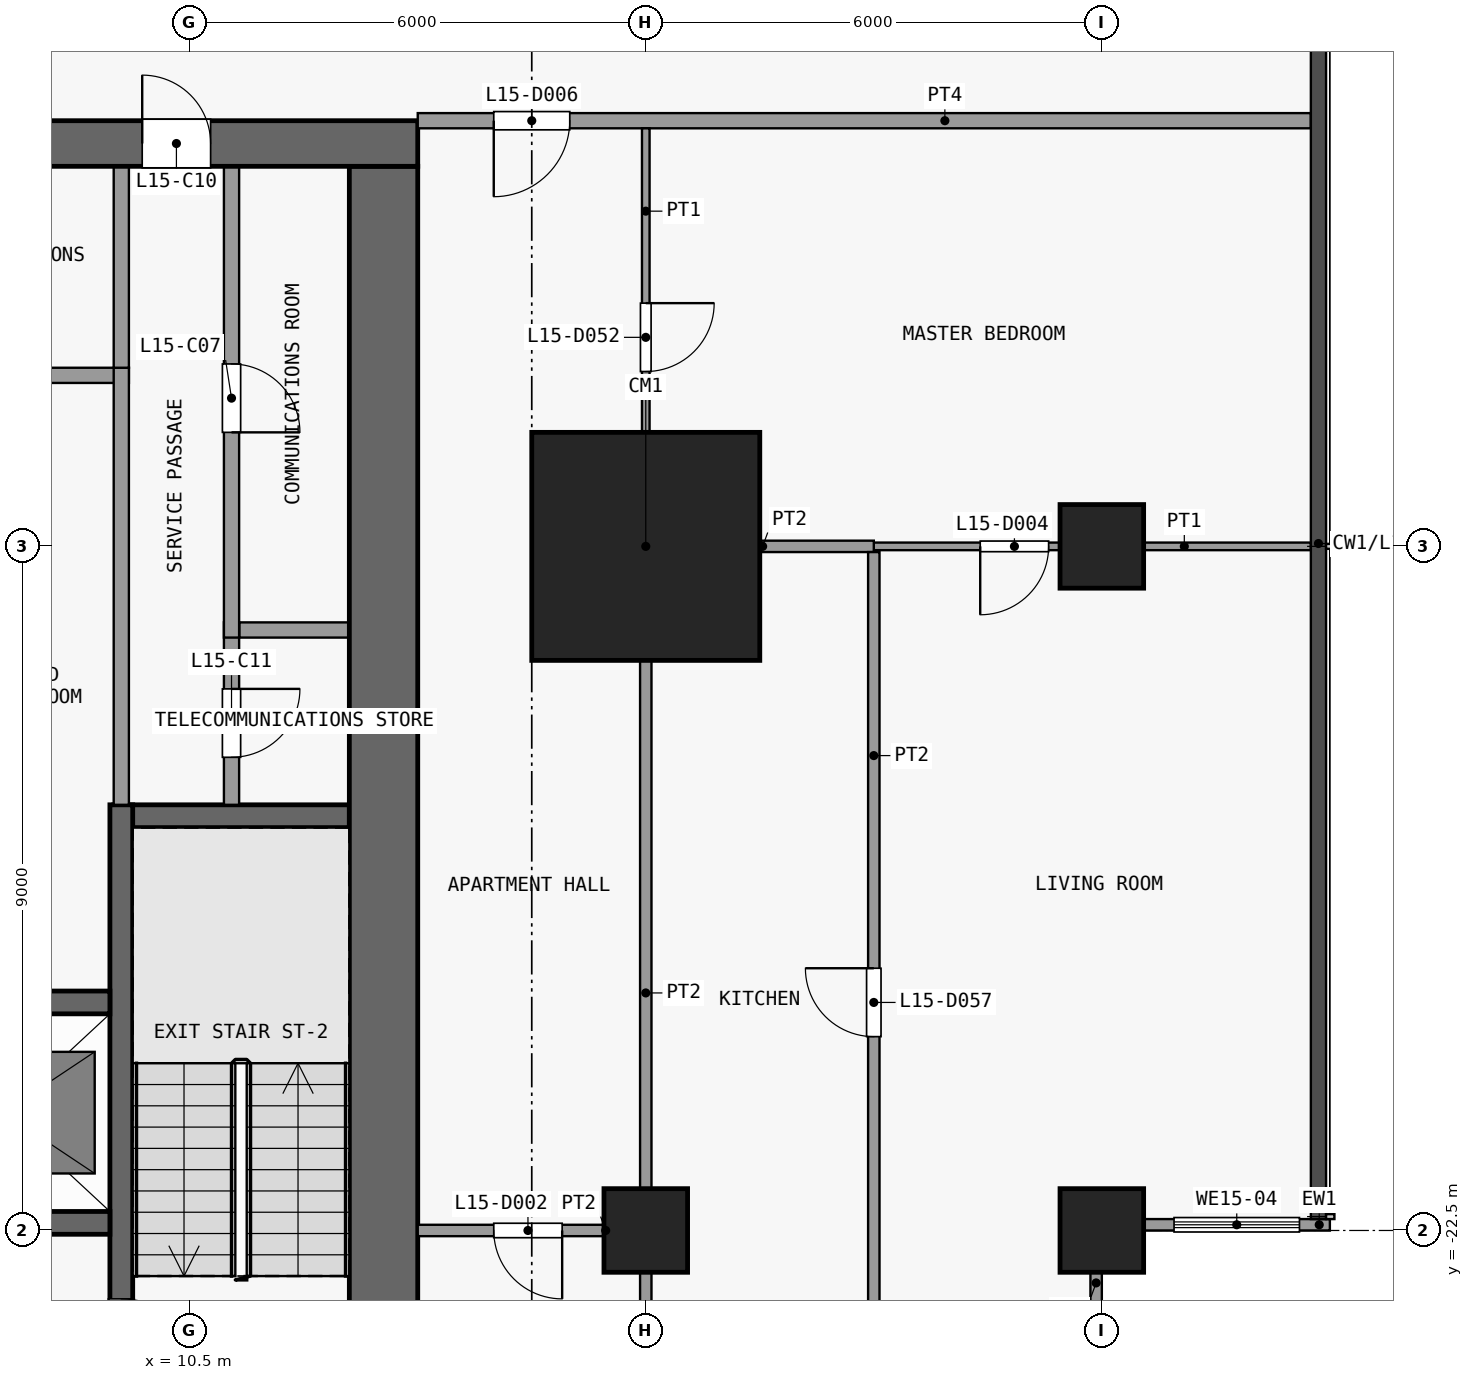
"""IFC4 building model, lengths in metres.
Left out: names, types, materials, properties, quantities, classifications, styles, units other than length and angle.
Written with IfcOpenShell. Run it as: python <this file> out.ifc"""

import sys

from ifc_helpers import new_model, si_unit, direction, frame, frame_2d, origin, origin_2d, place, context, subcontext, project, spatial, rectangle, extrude, element, fill, save


model = new_model("IFC4")
c1 = context("Model", 3, precision=1e-05, world=origin(), true_north=direction((0.0, 1.0)))
c2 = subcontext(c1, "Body", "Model", "MODEL_VIEW")
j1 = project(units=[si_unit("LENGTHUNIT", "METRE"), si_unit("PLANEANGLEUNIT", "RADIAN")], contexts=[c1])
p1 = place(None, origin())
s1 = spatial("IfcSite", under=j1, at=p1, CompositionType="ELEMENT")
p2 = place(p1, origin())
s2 = spatial("IfcBuilding", under=s1, at=p2, CompositionType="ELEMENT")
p3 = place(p2, frame((0.0, 0.0, 64.9)))
s3 = spatial("IfcBuildingStorey", under=s2, at=p3, CompositionType="ELEMENT", Elevation=64.9)
p4 = place(p3, frame((16.5, -22.5, 0.0), z_axis=(0.0, 0.0, 1.0), x_axis=(1.0, 0.0, 0.0)))
e1 = element("IfcColumn", 1, at=p4, inside=s3, PredefinedType="COLUMN", context=c2, shape_type="SweptSolid", body=[
    extrude(rectangle(XDim=1.1, YDim=1.1, at=origin_2d()), origin(), (0.0, 0.0, 1.0), 3.6),
])
p5 = place(p3, frame((16.5, -13.5, 0.0), z_axis=(0.0, 0.0, 1.0), x_axis=(1.0, 0.0, 0.0)))
e2 = element("IfcColumn", 2, at=p5, inside=s3, PredefinedType="COLUMN", context=c2, shape_type="SweptSolid", body=[
    extrude(rectangle(XDim=3.0, YDim=3.0, at=origin_2d()), origin(), (0.0, 0.0, 1.0), 3.6),
])
for number, where, z_axis, x_axis in (
    (3, (22.5, -22.5, 0.0), (0.0, 0.0, 1.0), (1.0, 0.0, 0.0)),
    (4, (22.5, -13.5, 0.0), (0.0, 0.0, 1.0), (1.0, 0.0, 0.0)),
):
    element("IfcColumn", number, at=place(p3, frame(where, z_axis=z_axis, x_axis=x_axis)), inside=s3, PredefinedType="COLUMN", context=c2, shape_type="SweptSolid", body=[
        extrude(rectangle(XDim=1.1, YDim=1.1, at=origin_2d()), origin(), (0.0, 0.0, 1.0), 3.6),
    ])
p6 = place(p3, frame((-13.5, -8.2, 0.0), z_axis=(0.0, 0.0, 1.0), x_axis=(1.0, 0.0, 0.0)))
e5 = element("IfcWall", 5, at=p6, inside=s3, PredefinedType="SHEAR", context=c2, shape_type="SweptSolid", body=[
    extrude(rectangle(XDim=27.0, YDim=0.6, at=frame_2d((13.5, 0.0))), origin(), (0.0, 0.0, 1.0), 3.3),
])
p7 = place(p6, frame((7.8, 0.0, 0.0)))
e6 = element("IfcOpeningElement", 6, at=p7, cuts=e5, PredefinedType="OPENING", context=c2, shape_type="SweptSolid", body=[
    extrude(rectangle(XDim=1.8, YDim=2.1, at=frame_2d((0.9, 1.05))), frame((0.0, 0.31, 0.0), z_axis=(0.0, -1.0, 0.0), x_axis=(1.0, 0.0, 0.0)), (0.0, 0.0, 1.0), 0.62),
])
p8 = place(p6, frame((17.4, 0.0, 0.0)))
e7 = element("IfcOpeningElement", 7, at=p8, cuts=e5, PredefinedType="OPENING", context=c2, shape_type="SweptSolid", body=[
    extrude(rectangle(XDim=1.8, YDim=2.1, at=frame_2d((0.9, 1.05))), frame((0.0, 0.31, 0.0), z_axis=(0.0, -1.0, 0.0), x_axis=(1.0, 0.0, 0.0)), (0.0, 0.0, 1.0), 0.62),
])
p9 = place(p6, frame((1.725, 0.0, 0.0)))
e8 = element("IfcOpeningElement", 8, at=p9, cuts=e5, PredefinedType="OPENING", context=c2, shape_type="SweptSolid", body=[
    extrude(rectangle(XDim=1.2, YDim=2.1, at=frame_2d((0.6, 1.05))), frame((0.0, 0.31, 0.0), z_axis=(0.0, -1.0, 0.0), x_axis=(1.0, 0.0, 0.0)), (0.0, 0.0, 1.0), 0.62),
])
p10 = place(p6, frame((23.375, 0.0, 0.0)))
e9 = element("IfcOpeningElement", 9, at=p10, cuts=e5, PredefinedType="OPENING", context=c2, shape_type="SweptSolid", body=[
    extrude(rectangle(XDim=0.9, YDim=2.1, at=frame_2d((0.45, 1.05))), frame((0.0, 0.31, 0.0), z_axis=(0.0, -1.0, 0.0), x_axis=(1.0, 0.0, 0.0)), (0.0, 0.0, 1.0), 0.62),
])
p11 = place(p3, frame((13.05, -24.6, 0.0), z_axis=(0.0, 0.0, 1.0), x_axis=(0.0, 1.0, 0.0)))
e10 = element("IfcWall", 10, at=p11, inside=s3, PredefinedType="SHEAR", context=c2, shape_type="SweptSolid", body=[
    extrude(rectangle(XDim=16.1, YDim=0.9, at=frame_2d((8.05, 0.0))), origin(), (0.0, 0.0, 1.0), 3.3),
])
p12 = place(p3, frame((6.35, -22.4, 0.0), z_axis=(0.0, 0.0, 1.0), x_axis=(1.0, 0.0, 0.0)))
e11 = element("IfcWall", 11, at=p12, inside=s3, PredefinedType="SHEAR", context=c2, shape_type="SweptSolid", body=[
    extrude(rectangle(XDim=3.1, YDim=0.3, at=frame_2d((1.55, 0.0))), origin(), (0.0, 0.0, 1.0), 3.3),
])
p13 = place(p3, frame((6.425, -19.5, 0.0), z_axis=(0.0, 0.0, 1.0), x_axis=(1.0, 0.0, 0.0)))
e12 = element("IfcWall", 12, at=p13, inside=s3, PredefinedType="SHEAR", context=c2, shape_type="SweptSolid", body=[
    extrude(rectangle(XDim=3.025, YDim=0.3, at=frame_2d((1.512, 0.0))), origin(), (0.0, 0.0, 1.0), 3.3),
])
p14 = place(p3, frame((9.5, -17.05, 0.0), z_axis=(0.0, 0.0, 1.0), x_axis=(1.0, 0.0, 0.0)))
e13 = element("IfcWall", 13, at=p14, inside=s3, PredefinedType="SHEAR", context=c2, shape_type="SweptSolid", body=[
    extrude(rectangle(XDim=3.1, YDim=0.3, at=frame_2d((1.55, 0.0))), origin(), (0.0, 0.0, 1.0), 3.3),
])
p15 = place(p3, frame((11.15, -14.6, 0.0), z_axis=(0.0, 0.0, 1.0), x_axis=(1.0, 0.0, 0.0)))
e14 = element("IfcWall", 14, at=p15, inside=s3, PredefinedType="PARTITIONING", context=c2, shape_type="SweptSolid", body=[
    extrude(rectangle(XDim=1.45, YDim=0.2, at=frame_2d((0.725, 0.0))), origin(), (0.0, 0.0, 1.0), 3.3),
])
p16 = place(p3, frame((6.4, -11.25, 0.0), z_axis=(0.0, 0.0, 1.0), x_axis=(1.0, 0.0, 0.0)))
e15 = element("IfcWall", 15, at=p16, inside=s3, PredefinedType="PARTITIONING", context=c2, shape_type="SweptSolid", body=[
    extrude(rectangle(XDim=3.3, YDim=0.2, at=frame_2d((1.65, 0.0))), origin(), (0.0, 0.0, 1.0), 3.3),
])
p17 = place(p3, frame((9.6, -16.9, 0.0), z_axis=(0.0, 0.0, 1.0), x_axis=(0.0, -1.0, 0.0)))
e16 = element("IfcWall", 16, at=p17, inside=s3, PredefinedType="SHEAR", context=c2, shape_type="SweptSolid", body=[
    extrude(rectangle(XDim=7.7, YDim=0.3, at=frame_2d((3.85, 0.0))), origin(), (0.0, 0.0, 1.0), 3.3),
])
p18 = place(p17, frame((6.5, 0.0, 0.0)))
e17 = element("IfcOpeningElement", 17, at=p18, cuts=e16, PredefinedType="OPENING", context=c2, shape_type="SweptSolid", body=[
    extrude(rectangle(XDim=1.1, YDim=2.1, at=frame_2d((0.55, 1.05))), frame((0.0, 0.16, 0.0), z_axis=(0.0, -1.0, 0.0), x_axis=(1.0, 0.0, 0.0)), (0.0, 0.0, 1.0), 0.32),
])
p19 = place(p3, frame((9.6, -16.9, 0.0), z_axis=(0.0, 0.0, 1.0), x_axis=(0.0, 1.0, 0.0)))
e18 = element("IfcWall", 18, at=p19, inside=s3, PredefinedType="PARTITIONING", context=c2, shape_type="SweptSolid", body=[
    extrude(rectangle(XDim=5.75, YDim=0.2, at=frame_2d((2.875, 0.0))), origin(), (0.0, 0.0, 1.0), 3.3),
])
p20 = place(p3, frame((9.6, -11.15, 0.0), z_axis=(0.0, 0.0, 1.0), x_axis=(0.0, 1.0, 0.0)))
e19 = element("IfcWall", 19, at=p20, inside=s3, PredefinedType="PARTITIONING", context=c2, shape_type="SweptSolid", body=[
    extrude(rectangle(XDim=2.65, YDim=0.2, at=frame_2d((1.325, 0.0))), origin(), (0.0, 0.0, 1.0), 3.3),
])
p21 = place(p3, frame((11.05, -14.5, 0.0), z_axis=(0.0, 0.0, 1.0), x_axis=(0.0, -1.0, 0.0)))
e20 = element("IfcWall", 20, at=p21, inside=s3, PredefinedType="PARTITIONING", context=c2, shape_type="SweptSolid", body=[
    extrude(rectangle(XDim=2.4, YDim=0.2, at=frame_2d((1.2, 0.0))), origin(), (0.0, 0.0, 1.0), 3.3),
])
p22 = place(p21, frame((0.875, 0.0, 0.0)))
e21 = element("IfcOpeningElement", 21, at=p22, cuts=e20, PredefinedType="OPENING", context=c2, shape_type="SweptSolid", body=[
    extrude(rectangle(XDim=0.9, YDim=2.1, at=frame_2d((0.45, 1.05))), frame((0.0, 0.11, 0.0), z_axis=(0.0, -1.0, 0.0), x_axis=(1.0, 0.0, 0.0)), (0.0, 0.0, 1.0), 0.22),
])
p23 = place(p3, frame((11.05, -8.5, 0.0), z_axis=(0.0, 0.0, 1.0), x_axis=(0.0, -1.0, 0.0)))
e22 = element("IfcWall", 22, at=p23, inside=s3, PredefinedType="PARTITIONING", context=c2, shape_type="SweptSolid", body=[
    extrude(rectangle(XDim=6.2, YDim=0.2, at=frame_2d((3.1, 0.0))), origin(), (0.0, 0.0, 1.0), 3.3),
])
p24 = place(p23, frame((2.6, 0.0, 0.0)))
e23 = element("IfcOpeningElement", 23, at=p24, cuts=e22, PredefinedType="OPENING", context=c2, shape_type="SweptSolid", body=[
    extrude(rectangle(XDim=0.9, YDim=2.1, at=frame_2d((0.45, 1.05))), frame((0.0, 0.11, 0.0), z_axis=(0.0, -1.0, 0.0), x_axis=(1.0, 0.0, 0.0)), (0.0, 0.0, 1.0), 0.22),
])
p25 = place(p3, frame((22.425, -23.05, 0.0), z_axis=(0.0, 0.0, 1.0), x_axis=(0.0, -1.0, 0.0)))
e24 = element("IfcWall", 24, at=p25, inside=s3, PredefinedType="SOLIDWALL", context=c2, shape_type="SweptSolid", body=[
    extrude(rectangle(XDim=2.2, YDim=0.15, at=frame_2d((1.1, 0.0))), origin(), (0.0, 0.0, 1.0), 3.3),
])
p26 = place(p25, frame((0.4, 0.0, 0.9)))
e25 = element("IfcOpeningElement", 25, at=p26, cuts=e24, PredefinedType="OPENING", context=c2, shape_type="SweptSolid", body=[
    extrude(rectangle(XDim=1.4, YDim=2.4, at=frame_2d((0.7, 1.2))), frame((0.0, 0.085, 0.0), z_axis=(0.0, -1.0, 0.0), x_axis=(1.0, 0.0, 0.0)), (0.0, 0.0, 1.0), 0.17),
])
p27 = place(p3, frame((25.5, -22.425, 0.0), z_axis=(0.0, 0.0, 1.0), x_axis=(-1.0, 0.0, 0.0)))
e26 = element("IfcWall", 26, at=p27, inside=s3, PredefinedType="SOLIDWALL", context=c2, shape_type="SweptSolid", body=[
    extrude(rectangle(XDim=2.45, YDim=0.15, at=frame_2d((1.225, 0.0))), origin(), (0.0, 0.0, 1.0), 3.3),
])
p28 = place(p27, frame((0.4, 0.0, 0.9)))
e27 = element("IfcOpeningElement", 27, at=p28, cuts=e26, PredefinedType="OPENING", context=c2, shape_type="SweptSolid", body=[
    extrude(rectangle(XDim=1.65, YDim=2.4, at=frame_2d((0.825, 1.2))), frame((0.0, 0.085, 0.0), z_axis=(0.0, -1.0, 0.0), x_axis=(1.0, 0.0, 0.0)), (0.0, 0.0, 1.0), 0.17),
])
p29 = place(p3, frame((13.5, -22.5, 0.0), z_axis=(0.0, 0.0, 1.0), x_axis=(1.0, 0.0, 0.0)))
e28 = element("IfcWall", 28, at=p29, inside=s3, PredefinedType="PARTITIONING", context=c2, shape_type="SweptSolid", body=[
    extrude(rectangle(XDim=2.925, YDim=0.15, at=frame_2d((1.462, 0.0))), origin(), (0.0, 0.0, 1.0), 3.3),
])
p30 = place(p29, frame((1.0, 0.0, 0.0)))
e29 = element("IfcOpeningElement", 29, at=p30, cuts=e28, PredefinedType="OPENING", context=c2, shape_type="SweptSolid", body=[
    extrude(rectangle(XDim=0.9, YDim=2.1, at=frame_2d((0.45, 1.05))), frame((0.0, 0.085, 0.0), z_axis=(0.0, -1.0, 0.0), x_axis=(1.0, 0.0, 0.0)), (0.0, 0.0, 1.0), 0.17),
])
p31 = place(p3, frame((19.5, -13.5, 0.0), z_axis=(0.0, 0.0, 1.0), x_axis=(1.0, 0.0, 0.0)))
e30 = element("IfcWall", 30, at=p31, inside=s3, PredefinedType="PARTITIONING", context=c2, shape_type="SweptSolid", body=[
    extrude(rectangle(XDim=5.75, YDim=0.1, at=frame_2d((2.875, 0.0))), origin(), (0.0, 0.0, 1.0), 3.3),
])
p32 = place(p31, frame((1.4, 0.0, 0.0)))
e31 = element("IfcOpeningElement", 31, at=p32, cuts=e30, PredefinedType="OPENING", context=c2, shape_type="SweptSolid", body=[
    extrude(rectangle(XDim=0.9, YDim=2.1, at=frame_2d((0.45, 1.05))), frame((0.0, 0.06, 0.0), z_axis=(0.0, -1.0, 0.0), x_axis=(1.0, 0.0, 0.0)), (0.0, 0.0, 1.0), 0.12),
])
p33 = place(p3, frame((16.575, -13.5, 0.0), z_axis=(0.0, 0.0, 1.0), x_axis=(1.0, 0.0, 0.0)))
e32 = element("IfcWall", 32, at=p33, inside=s3, PredefinedType="PARTITIONING", context=c2, shape_type="SweptSolid", body=[
    extrude(rectangle(XDim=2.925, YDim=0.15, at=frame_2d((1.462, 0.0))), origin(), (0.0, 0.0, 1.0), 3.3),
])
p34 = place(p3, frame((13.5, -7.9, 0.0), z_axis=(0.0, 0.0, 1.0), x_axis=(1.0, 0.0, 0.0)))
e33 = element("IfcWall", 33, at=p34, inside=s3, PredefinedType="PARTITIONING", context=c2, shape_type="SweptSolid", body=[
    extrude(rectangle(XDim=11.75, YDim=0.2, at=frame_2d((5.875, 0.0))), origin(), (0.0, 0.0, 1.0), 3.3),
])
p35 = place(p34, frame((1.0, 0.0, 0.0)))
e34 = element("IfcOpeningElement", 34, at=p35, cuts=e33, PredefinedType="OPENING", context=c2, shape_type="SweptSolid", body=[
    extrude(rectangle(XDim=1.0, YDim=2.1, at=frame_2d((0.5, 1.05))), frame((0.0, 0.11, 0.0), z_axis=(0.0, -1.0, 0.0), x_axis=(1.0, 0.0, 0.0)), (0.0, 0.0, 1.0), 0.22),
])
p36 = place(p3, frame((16.5, -13.5, 0.0), z_axis=(0.0, 0.0, 1.0), x_axis=(0.0, 1.0, 0.0)))
e35 = element("IfcWall", 35, at=p36, inside=s3, PredefinedType="PARTITIONING", context=c2, shape_type="SweptSolid", body=[
    extrude(rectangle(XDim=5.5, YDim=0.1, at=frame_2d((2.75, 0.0))), origin(), (0.0, 0.0, 1.0), 3.3),
])
p37 = place(p36, frame((2.3, 0.0, 0.0)))
e36 = element("IfcOpeningElement", 36, at=p37, cuts=e35, PredefinedType="OPENING", context=c2, shape_type="SweptSolid", body=[
    extrude(rectangle(XDim=0.9, YDim=2.1, at=frame_2d((0.45, 1.05))), frame((0.0, 0.06, 0.0), z_axis=(0.0, -1.0, 0.0), x_axis=(1.0, 0.0, 0.0)), (0.0, 0.0, 1.0), 0.12),
])
p38 = place(p3, frame((16.5, -25.25, 0.0), z_axis=(0.0, 0.0, 1.0), x_axis=(0.0, 1.0, 0.0)))
e37 = element("IfcWall", 37, at=p38, inside=s3, PredefinedType="PARTITIONING", context=c2, shape_type="SweptSolid", body=[
    extrude(rectangle(XDim=11.75, YDim=0.15, at=frame_2d((5.875, 0.0))), origin(), (0.0, 0.0, 1.0), 3.3),
])
p39 = place(p3, frame((19.5, -25.25, 0.0), z_axis=(0.0, 0.0, 1.0), x_axis=(0.0, 1.0, 0.0)))
e38 = element("IfcWall", 38, at=p39, inside=s3, PredefinedType="PARTITIONING", context=c2, shape_type="SweptSolid", body=[
    extrude(rectangle(XDim=11.675, YDim=0.15, at=frame_2d((5.837, 0.0))), origin(), (0.0, 0.0, 1.0), 3.3),
])
p40 = place(p39, frame((5.3, 0.0, 0.0)))
e39 = element("IfcOpeningElement", 39, at=p40, cuts=e38, PredefinedType="OPENING", context=c2, shape_type="SweptSolid", body=[
    extrude(rectangle(XDim=0.9, YDim=2.1, at=frame_2d((0.45, 1.05))), frame((0.0, 0.085, 0.0), z_axis=(0.0, -1.0, 0.0), x_axis=(1.0, 0.0, 0.0)), (0.0, 0.0, 1.0), 0.17),
])
p41 = place(p24, origin())
e40 = element("IfcDoor", 40, at=p41, inside=s3, OperationType="SINGLE_SWING_RIGHT", PredefinedType="DOOR", context=c2, shape_type="SweptSolid", body=[
    extrude(rectangle(XDim=0.9, YDim=2.1, at=frame_2d((0.45, 1.05))), frame((0.0, 0.025, 0.0), z_axis=(0.0, -1.0, 0.0), x_axis=(1.0, 0.0, 0.0)), (0.0, 0.0, 1.0), 0.05),
])
fill(e23, e40)
p42 = place(p10, origin())
e41 = element("IfcDoor", 41, at=p42, inside=s3, OperationType="SINGLE_SWING_LEFT", PredefinedType="DOOR", context=c2, shape_type="SweptSolid", body=[
    extrude(rectangle(XDim=0.9, YDim=2.1, at=frame_2d((0.45, 1.05))), frame((0.0, 0.025, 0.0), z_axis=(0.0, -1.0, 0.0), x_axis=(1.0, 0.0, 0.0)), (0.0, 0.0, 1.0), 0.05),
])
fill(e9, e41)
p43 = place(p22, origin())
e42 = element("IfcDoor", 42, at=p43, inside=s3, OperationType="SINGLE_SWING_LEFT", PredefinedType="DOOR", context=c2, shape_type="SweptSolid", body=[
    extrude(rectangle(XDim=0.9, YDim=2.1, at=frame_2d((0.45, 1.05))), frame((0.0, 0.025, 0.0), z_axis=(0.0, -1.0, 0.0), x_axis=(1.0, 0.0, 0.0)), (0.0, 0.0, 1.0), 0.05),
])
fill(e21, e42)
p44 = place(p18, origin())
e43 = element("IfcDoor", 43, at=p44, inside=s3, OperationType="SINGLE_SWING_RIGHT", PredefinedType="DOOR", context=c2, shape_type="SweptSolid", body=[
    extrude(rectangle(XDim=1.1, YDim=2.1, at=frame_2d((0.55, 1.05))), frame((0.0, 0.025, 0.0), z_axis=(0.0, -1.0, 0.0), x_axis=(1.0, 0.0, 0.0)), (0.0, 0.0, 1.0), 0.05),
])
fill(e17, e43)
p45 = place(p28, origin())
e44 = element("IfcWindow", 44, at=p45, inside=s3, PartitioningType="SINGLE_PANEL", PredefinedType="WINDOW", context=c2, shape_type="SweptSolid", body=[
    extrude(rectangle(XDim=1.65, YDim=2.4, at=frame_2d((0.825, 1.2))), frame((0.0, 0.03, 0.0), z_axis=(0.0, -1.0, 0.0), x_axis=(1.0, 0.0, 0.0)), (0.0, 0.0, 1.0), 0.06),
])
fill(e27, e44)
p46 = place(p30, origin())
e45 = element("IfcDoor", 45, at=p46, inside=s3, OperationType="SINGLE_SWING_RIGHT", PredefinedType="DOOR", context=c2, shape_type="SweptSolid", body=[
    extrude(rectangle(XDim=0.9, YDim=2.1, at=frame_2d((0.45, 1.05))), frame((0.0, 0.025, 0.0), z_axis=(0.0, -1.0, 0.0), x_axis=(1.0, 0.0, 0.0)), (0.0, 0.0, 1.0), 0.05),
])
fill(e29, e45)
p47 = place(p32, origin())
e46 = element("IfcDoor", 46, at=p47, inside=s3, OperationType="SINGLE_SWING_LEFT", PredefinedType="DOOR", context=c2, shape_type="SweptSolid", body=[
    extrude(rectangle(XDim=0.9, YDim=2.1, at=frame_2d((0.45, 1.05))), frame((0.0, 0.025, 0.0), z_axis=(0.0, -1.0, 0.0), x_axis=(1.0, 0.0, 0.0)), (0.0, 0.0, 1.0), 0.05),
])
fill(e31, e46)
p48 = place(p35, origin())
e47 = element("IfcDoor", 47, at=p48, inside=s3, OperationType="SINGLE_SWING_LEFT", PredefinedType="DOOR", context=c2, shape_type="SweptSolid", body=[
    extrude(rectangle(XDim=1.0, YDim=2.1, at=frame_2d((0.5, 1.05))), frame((0.0, 0.025, 0.0), z_axis=(0.0, -1.0, 0.0), x_axis=(1.0, 0.0, 0.0)), (0.0, 0.0, 1.0), 0.05),
])
fill(e34, e47)
p49 = place(p37, origin())
e48 = element("IfcDoor", 48, at=p49, inside=s3, OperationType="SINGLE_SWING_RIGHT", PredefinedType="DOOR", context=c2, shape_type="SweptSolid", body=[
    extrude(rectangle(XDim=0.9, YDim=2.1, at=frame_2d((0.45, 1.05))), frame((0.0, 0.025, 0.0), z_axis=(0.0, -1.0, 0.0), x_axis=(1.0, 0.0, 0.0)), (0.0, 0.0, 1.0), 0.05),
])
fill(e36, e48)
p50 = place(p40, origin())
e49 = element("IfcDoor", 49, at=p50, inside=s3, OperationType="SINGLE_SWING_LEFT", PredefinedType="DOOR", context=c2, shape_type="SweptSolid", body=[
    extrude(rectangle(XDim=0.9, YDim=2.1, at=frame_2d((0.45, 1.05))), frame((0.0, 0.025, 0.0), z_axis=(0.0, -1.0, 0.0), x_axis=(1.0, 0.0, 0.0)), (0.0, 0.0, 1.0), 0.05),
])
fill(e39, e49)
save(model, sys.argv[1])
